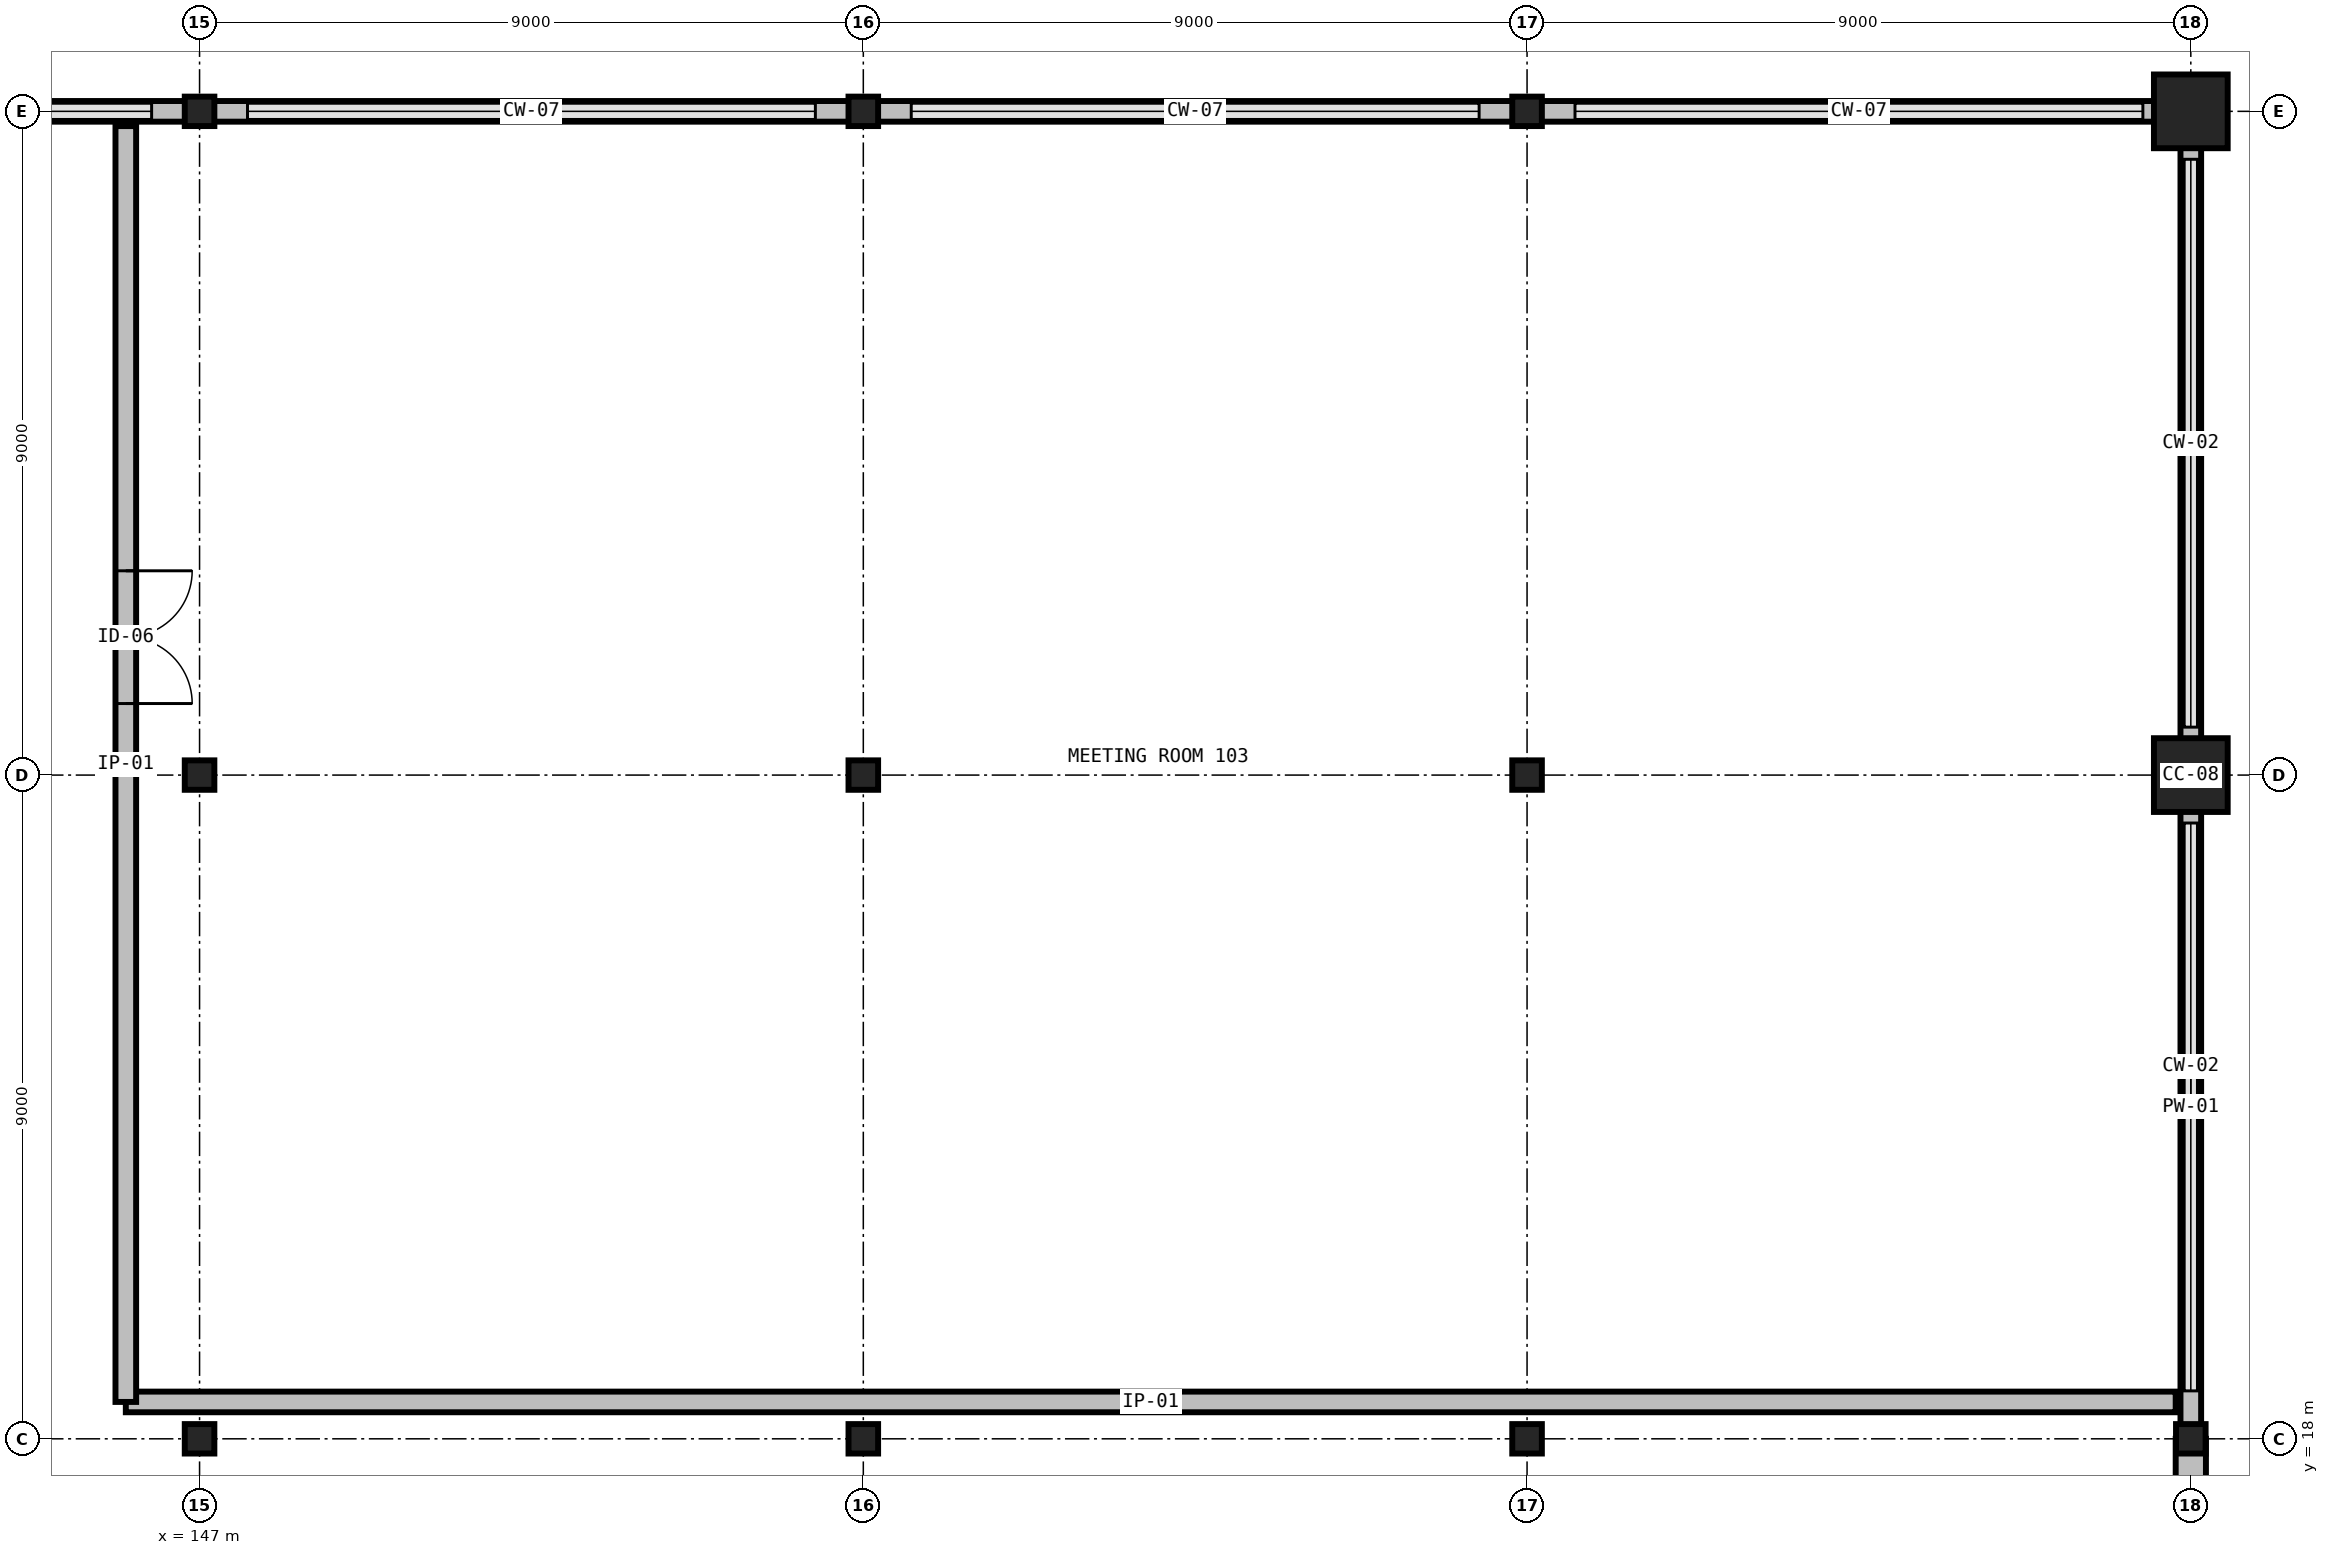
"""IFC4 building model, lengths in metres.
Left out: names, types, materials, properties, quantities, classifications, styles, units other than length and angle.
Written with IfcOpenShell. Run it as: python <this file> out.ifc"""

import sys

from ifc_helpers import new_model, si_unit, direction, frame, frame_2d, origin, origin_2d, place, context, subcontext, project, spatial, rectangle, circle, i_section, extrude, element, fill, save


model = new_model("IFC4")
c1 = context("Model", 3, precision=1e-05, world=origin(), true_north=direction((0.0, 1.0)))
c2 = subcontext(c1, "Body", "Model", "MODEL_VIEW")
j1 = project(units=[si_unit("LENGTHUNIT", "METRE"), si_unit("PLANEANGLEUNIT", "RADIAN")], contexts=[c1])
p1 = place(None, origin())
s1 = spatial("IfcSite", under=j1, at=p1, CompositionType="ELEMENT")
p2 = place(p1, origin())
s2 = spatial("IfcBuilding", under=s1, at=p2, CompositionType="ELEMENT")
p3 = place(p2, frame((0.0, 0.0, 6.0)))
s3 = spatial("IfcBuildingStorey", under=s2, at=p3, CompositionType="ELEMENT", Elevation=6.0)
for number, where, z_axis, x_axis in (
    (1, (147.0, 18.0, 0.0), (0.0, 0.0, 1.0), (1.0, 0.0, 0.0)),
    (2, (147.0, 27.0, 0.0), (0.0, 0.0, 1.0), (1.0, 0.0, 0.0)),
    (3, (147.0, 36.0, 0.0), (0.0, 0.0, 1.0), (1.0, 0.0, 0.0)),
    (4, (156.0, 18.0, 0.0), (0.0, 0.0, 1.0), (1.0, 0.0, 0.0)),
    (5, (156.0, 27.0, 0.0), (0.0, 0.0, 1.0), (1.0, 0.0, 0.0)),
    (6, (156.0, 36.0, 0.0), (0.0, 0.0, 1.0), (1.0, 0.0, 0.0)),
    (7, (165.0, 18.0, 0.0), (0.0, 0.0, 1.0), (1.0, 0.0, 0.0)),
    (8, (165.0, 27.0, 0.0), (0.0, 0.0, 1.0), (1.0, 0.0, 0.0)),
    (9, (165.0, 36.0, 0.0), (0.0, 0.0, 1.0), (1.0, 0.0, 0.0)),
    (10, (174.0, 18.0, 0.0), (0.0, 0.0, 1.0), (1.0, 0.0, 0.0)),
):
    element("IfcColumn", number, at=place(p3, frame(where, z_axis=z_axis, x_axis=x_axis)), inside=s3, PredefinedType="COLUMN", context=c2, shape_type="SweptSolid", body=[
        extrude(i_section(OverallWidth=0.401, OverallDepth=0.399, WebThickness=0.025, FlangeThickness=0.04, FilletRadius=0.031, at=origin_2d()), origin(), (0.0, 0.0, 1.0), 6.0),
    ])
for number, where, z_axis, x_axis in (
    (11, (174.0, 27.0, 0.0), (0.0, 0.0, 1.0), (1.0, 0.0, 0.0)),
    (12, (174.0, 36.0, 0.0), (0.0, 0.0, 1.0), (1.0, 0.0, 0.0)),
):
    element("IfcColumn", number, at=place(p3, frame(where, z_axis=z_axis, x_axis=x_axis)), inside=s3, PredefinedType="COLUMN", context=c2, shape_type="SweptSolid", body=[
        extrude(circle(Radius=0.5, at=origin_2d()), origin(), (0.0, 0.0, 1.0), 6.0),
    ])
p4 = place(p3, frame((174.0, 9.0, 0.0), z_axis=(0.0, 0.0, 1.0), x_axis=(0.0, 1.0, 0.0)))
e13 = element("IfcWall", 13, at=p4, inside=s3, PredefinedType="STANDARD", context=c2, shape_type="SweptSolid", body=[
    extrude(rectangle(XDim=9.0, YDim=0.41, at=frame_2d((4.5, 0.0))), origin(), (0.0, 0.0, 1.0), 5.269),
])
for number, where, z_axis, x_axis in (
    (14, (174.0, 18.0, 0.0), (0.0, 0.0, 1.0), (0.0, 1.0, 0.0)),
    (15, (174.0, 27.0, 0.0), (0.0, 0.0, 1.0), (0.0, 1.0, 0.0)),
    (16, (147.0, 36.0, 0.0), (0.0, 0.0, 1.0), (-1.0, 0.0, 0.0)),
    (17, (156.0, 36.0, 0.0), (0.0, 0.0, 1.0), (-1.0, 0.0, 0.0)),
    (18, (165.0, 36.0, 0.0), (0.0, 0.0, 1.0), (-1.0, 0.0, 0.0)),
    (19, (174.0, 36.0, 0.0), (0.0, 0.0, 1.0), (-1.0, 0.0, 0.0)),
):
    element("IfcWall", number, at=place(p3, frame(where, z_axis=z_axis, x_axis=x_axis)), inside=s3, PredefinedType="PARAPET", context=c2, shape_type="SweptSolid", body=[
        extrude(rectangle(XDim=9.0, YDim=0.28, at=frame_2d((4.5, 0.0))), origin(), (0.0, 0.0, 1.0), 0.2),
    ])
p5 = place(p3, frame((146.0, 18.5, 0.0), z_axis=(0.0, 0.0, 1.0), x_axis=(1.0, 0.0, 0.0)))
e20 = element("IfcWall", 20, at=p5, inside=s3, PredefinedType="PARTITIONING", context=c2, shape_type="SweptSolid", body=[
    extrude(rectangle(XDim=27.795, YDim=0.28, at=frame_2d((13.897, 0.0))), origin(), (0.0, 0.0, 1.0), 5.68),
])
p6 = place(p3, frame((146.0, 35.8, 0.0), z_axis=(0.0, 0.0, 1.0), x_axis=(0.0, -1.0, 0.0)))
e21 = element("IfcWall", 21, at=p6, inside=s3, PredefinedType="PARTITIONING", context=c2, shape_type="SweptSolid", body=[
    extrude(rectangle(XDim=17.3, YDim=0.28, at=frame_2d((8.65, 0.0))), origin(), (0.0, 0.0, 1.0), 5.68),
])
p7 = place(p6, frame((6.03, 0.0, 0.0)))
e22 = element("IfcOpeningElement", 22, at=p7, cuts=e21, PredefinedType="OPENING", context=c2, shape_type="SweptSolid", body=[
    extrude(rectangle(XDim=1.8, YDim=2.3, at=frame_2d((0.9, 1.15))), frame((0.0, 0.155, 0.0), z_axis=(0.0, -1.0, 0.0), x_axis=(1.0, 0.0, 0.0)), (0.0, 0.0, 1.0), 0.31),
])
p8 = place(p7, origin())
e23 = element("IfcDoor", 23, at=p8, inside=s3, OperationType="DOUBLE_DOOR_SINGLE_SWING", PredefinedType="DOOR", context=c2, shape_type="SweptSolid", body=[
    extrude(rectangle(XDim=1.8, YDim=2.3, at=frame_2d((0.9, 1.15))), frame((0.0, 0.025, 0.0), z_axis=(0.0, -1.0, 0.0), x_axis=(1.0, 0.0, 0.0)), (0.0, 0.0, 1.0), 0.05),
])
fill(e22, e23)
save(model, sys.argv[1])
